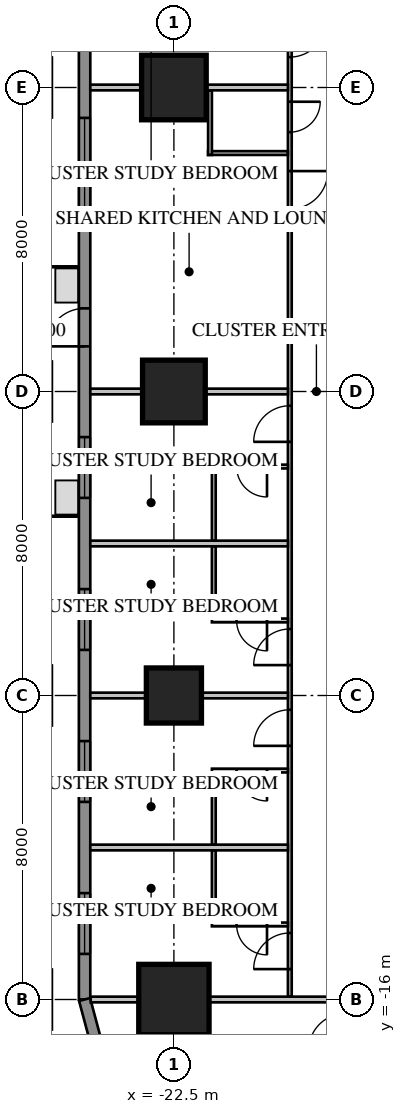
"""IFC4 building model, lengths in metres.
Left out: names, types, materials, properties, quantities, classifications, styles, units other than length and angle.
Written with IfcOpenShell. Run it as: python <this file> out.ifc"""

import sys

from ifc_helpers import new_model, si_unit, direction, frame, frame_2d, origin, origin_2d, place, context, subcontext, project, spatial, rectangle, extrude, element, fill, save


model = new_model("IFC4")
c1 = context("Model", 3, precision=1e-05, world=origin(), true_north=direction((0.0, 1.0)))
c2 = subcontext(c1, "Body", "Model", "MODEL_VIEW")
j1 = project(units=[si_unit("LENGTHUNIT", "METRE"), si_unit("PLANEANGLEUNIT", "RADIAN")], contexts=[c1])
p1 = place(None, origin())
s1 = spatial("IfcSite", under=j1, at=p1, CompositionType="ELEMENT")
p2 = place(p1, origin())
s2 = spatial("IfcBuilding", under=s1, at=p2, CompositionType="ELEMENT")
p3 = place(p2, frame((0.0, 0.0, 35.25)))
s3 = spatial("IfcBuildingStorey", under=s2, at=p3, CompositionType="ELEMENT", Elevation=35.25)
p4 = place(p3, frame((-22.5, 8.0, 0.0), z_axis=(0.0, 0.0, 1.0), x_axis=(1.0, 0.0, 0.0)))
e1 = element("IfcColumn", 1, at=p4, inside=s3, PredefinedType="COLUMN", context=c2, shape_type="SweptSolid", body=[
    extrude(rectangle(XDim=1.7, YDim=1.7, at=origin_2d()), origin(), (0.0, 0.0, 1.0), 3.85),
])
p5 = place(p3, frame((-22.5, 0.0, 0.0), z_axis=(0.0, 0.0, 1.0), x_axis=(1.0, 0.0, 0.0)))
e2 = element("IfcColumn", 2, at=p5, inside=s3, PredefinedType="COLUMN", context=c2, shape_type="SweptSolid", body=[
    extrude(rectangle(XDim=1.65, YDim=1.65, at=origin_2d()), origin(), (0.0, 0.0, 1.0), 3.85),
])
p6 = place(p3, frame((-22.5, -8.0, 0.0), z_axis=(0.0, 0.0, 1.0), x_axis=(1.0, 0.0, 0.0)))
e3 = element("IfcColumn", 3, at=p6, inside=s3, PredefinedType="COLUMN", context=c2, shape_type="SweptSolid", body=[
    extrude(rectangle(XDim=1.45, YDim=1.45, at=origin_2d()), origin(), (0.0, 0.0, 1.0), 3.85),
])
p7 = place(p3, frame((-22.5, -16.0, 0.0), z_axis=(0.0, 0.0, 1.0), x_axis=(1.0, 0.0, 0.0)))
e4 = element("IfcColumn", 4, at=p7, inside=s3, PredefinedType="COLUMN", context=c2, shape_type="SweptSolid", body=[
    extrude(rectangle(XDim=1.85, YDim=1.85, at=origin_2d()), origin(), (0.0, 0.0, 1.0), 3.85),
])
p8 = place(p3, frame((-24.85, 16.0, 0.0), z_axis=(0.0, 0.0, 1.0), x_axis=(0.0, -1.0, 0.0)))
e5 = element("IfcWall", 5, at=p8, inside=s3, PredefinedType="SOLIDWALL", context=c2, shape_type="SweptSolid", body=[
    extrude(rectangle(XDim=32.0, YDim=0.3, at=frame_2d((16.0, 0.0))), origin(), (0.0, 0.0, 1.0), 3.65),
])
p9 = place(p8, frame((1.2, 0.0, 0.75)))
e6 = element("IfcOpeningElement", 6, at=p9, cuts=e5, PredefinedType="OPENING", context=c2, shape_type="SweptSolid", body=[
    extrude(rectangle(XDim=1.6, YDim=1.8, at=frame_2d((0.8, 0.9))), frame((0.0, 0.17, 0.0), z_axis=(0.0, -1.0, 0.0), x_axis=(1.0, 0.0, 0.0)), (0.0, 0.0, 1.0), 0.34),
])
p10 = place(p8, frame((5.2, 0.0, 0.75)))
e7 = element("IfcOpeningElement", 7, at=p10, cuts=e5, PredefinedType="OPENING", context=c2, shape_type="SweptSolid", body=[
    extrude(rectangle(XDim=1.6, YDim=1.8, at=frame_2d((0.8, 0.9))), frame((0.0, 0.17, 0.0), z_axis=(0.0, -1.0, 0.0), x_axis=(1.0, 0.0, 0.0)), (0.0, 0.0, 1.0), 0.34),
])
p11 = place(p8, frame((17.2, 0.0, 0.75)))
e8 = element("IfcOpeningElement", 8, at=p11, cuts=e5, PredefinedType="OPENING", context=c2, shape_type="SweptSolid", body=[
    extrude(rectangle(XDim=1.6, YDim=1.8, at=frame_2d((0.8, 0.9))), frame((0.0, 0.17, 0.0), z_axis=(0.0, -1.0, 0.0), x_axis=(1.0, 0.0, 0.0)), (0.0, 0.0, 1.0), 0.34),
])
p12 = place(p8, frame((21.2, 0.0, 0.75)))
e9 = element("IfcOpeningElement", 9, at=p12, cuts=e5, PredefinedType="OPENING", context=c2, shape_type="SweptSolid", body=[
    extrude(rectangle(XDim=1.6, YDim=1.8, at=frame_2d((0.8, 0.9))), frame((0.0, 0.17, 0.0), z_axis=(0.0, -1.0, 0.0), x_axis=(1.0, 0.0, 0.0)), (0.0, 0.0, 1.0), 0.34),
])
p13 = place(p8, frame((25.2, 0.0, 0.75)))
e10 = element("IfcOpeningElement", 10, at=p13, cuts=e5, PredefinedType="OPENING", context=c2, shape_type="SweptSolid", body=[
    extrude(rectangle(XDim=1.6, YDim=1.8, at=frame_2d((0.8, 0.9))), frame((0.0, 0.17, 0.0), z_axis=(0.0, -1.0, 0.0), x_axis=(1.0, 0.0, 0.0)), (0.0, 0.0, 1.0), 0.34),
])
p14 = place(p8, frame((29.2, 0.0, 0.75)))
e11 = element("IfcOpeningElement", 11, at=p14, cuts=e5, PredefinedType="OPENING", context=c2, shape_type="SweptSolid", body=[
    extrude(rectangle(XDim=1.6, YDim=1.8, at=frame_2d((0.8, 0.9))), frame((0.0, 0.17, 0.0), z_axis=(0.0, -1.0, 0.0), x_axis=(1.0, 0.0, 0.0)), (0.0, 0.0, 1.0), 0.34),
])
p15 = place(p8, frame((8.8, 0.0, 0.75)))
e12 = element("IfcOpeningElement", 12, at=p15, cuts=e5, PredefinedType="OPENING", context=c2, shape_type="SweptSolid", body=[
    extrude(rectangle(XDim=2.4, YDim=1.8, at=frame_2d((1.2, 0.9))), frame((0.0, 0.17, 0.0), z_axis=(0.0, -1.0, 0.0), x_axis=(1.0, 0.0, 0.0)), (0.0, 0.0, 1.0), 0.34),
])
p16 = place(p8, frame((13.812, 0.0, 0.0)))
e13 = element("IfcOpeningElement", 13, at=p16, cuts=e5, PredefinedType="OPENING", context=c2, shape_type="SweptSolid", body=[
    extrude(rectangle(XDim=1.0, YDim=2.4, at=frame_2d((0.5, 1.2))), frame((0.0, 0.17, 0.0), z_axis=(0.0, -1.0, 0.0), x_axis=(1.0, 0.0, 0.0)), (0.0, 0.0, 1.0), 0.34),
])
p17 = place(p3, frame((-24.85, -16.0, 0.0), z_axis=(0.0, 0.0, 1.0), x_axis=(0.258839972501, -0.965920218567, 0.0)))
e14 = element("IfcWall", 14, at=p17, inside=s3, PredefinedType="SOLIDWALL", context=c2, shape_type="SweptSolid", body=[
    extrude(rectangle(XDim=4.581, YDim=0.3, at=frame_2d((2.291, 0.0))), origin(), (0.0, 0.0, 1.0), 3.65),
])
p18 = place(p3, frame((-19.45, 15.925, 0.0), z_axis=(0.0, 0.0, 1.0), x_axis=(0.0, -1.0, 0.0)))
e15 = element("IfcWall", 15, at=p18, inside=s3, PredefinedType="PARTITIONING", context=c2, shape_type="SweptSolid", body=[
    extrude(rectangle(XDim=31.85, YDim=0.1, at=frame_2d((15.925, 0.0))), origin(), (0.0, 0.0, 1.0), 3.65),
])
p19 = place(p18, frame((10.125, 0.0, 0.0)))
e16 = element("IfcOpeningElement", 16, at=p19, cuts=e15, PredefinedType="OPENING", context=c2, shape_type="SweptSolid", body=[
    extrude(rectangle(XDim=1.0, YDim=2.1, at=frame_2d((0.5, 1.05))), frame((0.0, 0.07, 0.0), z_axis=(0.0, -1.0, 0.0), x_axis=(1.0, 0.0, 0.0)), (0.0, 0.0, 1.0), 0.14),
])
p20 = place(p18, frame((8.3, 0.0, 0.0)))
e17 = element("IfcOpeningElement", 17, at=p20, cuts=e15, PredefinedType="OPENING", context=c2, shape_type="SweptSolid", body=[
    extrude(rectangle(XDim=0.8, YDim=2.1, at=frame_2d((0.4, 1.05))), frame((0.0, 0.07, 0.0), z_axis=(0.0, -1.0, 0.0), x_axis=(1.0, 0.0, 0.0)), (0.0, 0.0, 1.0), 0.14),
])
p21 = place(p18, frame((0.3, 0.0, 0.0)))
e18 = element("IfcOpeningElement", 18, at=p21, cuts=e15, PredefinedType="OPENING", context=c2, shape_type="SweptSolid", body=[
    extrude(rectangle(XDim=0.95, YDim=2.1, at=frame_2d((0.475, 1.05))), frame((0.0, 0.07, 0.0), z_axis=(0.0, -1.0, 0.0), x_axis=(1.0, 0.0, 0.0)), (0.0, 0.0, 1.0), 0.14),
])
p22 = place(p18, frame((6.175, 0.0, 0.0)))
e19 = element("IfcOpeningElement", 19, at=p22, cuts=e15, PredefinedType="OPENING", context=c2, shape_type="SweptSolid", body=[
    extrude(rectangle(XDim=0.95, YDim=2.1, at=frame_2d((0.475, 1.05))), frame((0.0, 0.07, 0.0), z_axis=(0.0, -1.0, 0.0), x_axis=(1.0, 0.0, 0.0)), (0.0, 0.0, 1.0), 0.14),
])
p23 = place(p18, frame((16.3, 0.0, 0.0)))
e20 = element("IfcOpeningElement", 20, at=p23, cuts=e15, PredefinedType="OPENING", context=c2, shape_type="SweptSolid", body=[
    extrude(rectangle(XDim=0.95, YDim=2.1, at=frame_2d((0.475, 1.05))), frame((0.0, 0.07, 0.0), z_axis=(0.0, -1.0, 0.0), x_axis=(1.0, 0.0, 0.0)), (0.0, 0.0, 1.0), 0.14),
])
p24 = place(p18, frame((22.175, 0.0, 0.0)))
e21 = element("IfcOpeningElement", 21, at=p24, cuts=e15, PredefinedType="OPENING", context=c2, shape_type="SweptSolid", body=[
    extrude(rectangle(XDim=0.95, YDim=2.1, at=frame_2d((0.475, 1.05))), frame((0.0, 0.07, 0.0), z_axis=(0.0, -1.0, 0.0), x_axis=(1.0, 0.0, 0.0)), (0.0, 0.0, 1.0), 0.14),
])
p25 = place(p18, frame((24.3, 0.0, 0.0)))
e22 = element("IfcOpeningElement", 22, at=p25, cuts=e15, PredefinedType="OPENING", context=c2, shape_type="SweptSolid", body=[
    extrude(rectangle(XDim=0.95, YDim=2.1, at=frame_2d((0.475, 1.05))), frame((0.0, 0.07, 0.0), z_axis=(0.0, -1.0, 0.0), x_axis=(1.0, 0.0, 0.0)), (0.0, 0.0, 1.0), 0.14),
])
p26 = place(p18, frame((30.175, 0.0, 0.0)))
e23 = element("IfcOpeningElement", 23, at=p26, cuts=e15, PredefinedType="OPENING", context=c2, shape_type="SweptSolid", body=[
    extrude(rectangle(XDim=0.95, YDim=2.1, at=frame_2d((0.475, 1.05))), frame((0.0, 0.07, 0.0), z_axis=(0.0, -1.0, 0.0), x_axis=(1.0, 0.0, 0.0)), (0.0, 0.0, 1.0), 0.14),
])
p27 = place(p3, frame((-19.5, 6.275, 0.0), z_axis=(0.0, 0.0, 1.0), x_axis=(-1.0, 0.0, 0.0)))
e24 = element("IfcWall", 24, at=p27, inside=s3, PredefinedType="PARTITIONING", context=c2, shape_type="SweptSolid", body=[
    extrude(rectangle(XDim=2.1, YDim=0.1, at=frame_2d((1.05, 0.0))), origin(), (0.0, 0.0, 1.0), 3.65),
])
p28 = place(p3, frame((-21.55, 7.925, 0.0), z_axis=(0.0, 0.0, 1.0), x_axis=(0.0, -1.0, 0.0)))
e25 = element("IfcWall", 25, at=p28, inside=s3, PredefinedType="PARTITIONING", context=c2, shape_type="SweptSolid", body=[
    extrude(rectangle(XDim=1.7, YDim=0.1, at=frame_2d((0.85, 0.0))), origin(), (0.0, 0.0, 1.0), 3.65),
])
p29 = place(p3, frame((-19.5, 8.0, 0.0), z_axis=(0.0, 0.0, 1.0), x_axis=(-1.0, 0.0, 0.0)))
e26 = element("IfcWall", 26, at=p29, inside=s3, PredefinedType="PARTITIONING", context=c2, shape_type="SweptSolid", body=[
    extrude(rectangle(XDim=5.2, YDim=0.15, at=frame_2d((2.6, 0.0))), origin(), (0.0, 0.0, 1.0), 3.65),
])
p30 = place(p3, frame((-19.5, 0.0, 0.0), z_axis=(0.0, 0.0, 1.0), x_axis=(-1.0, 0.0, 0.0)))
e27 = element("IfcWall", 27, at=p30, inside=s3, PredefinedType="PARTITIONING", context=c2, shape_type="SweptSolid", body=[
    extrude(rectangle(XDim=5.2, YDim=0.15, at=frame_2d((2.6, 0.0))), origin(), (0.0, 0.0, 1.0), 2.957),
])
for number, where, z_axis, x_axis in (
    (28, (-19.5, -4.0, 0.0), (0.0, 0.0, 1.0), (-1.0, 0.0, 0.0)),
    (29, (-19.5, -8.0, 0.0), (0.0, 0.0, 1.0), (-1.0, 0.0, 0.0)),
    (30, (-19.5, -12.0, 0.0), (0.0, 0.0, 1.0), (-1.0, 0.0, 0.0)),
):
    element("IfcWall", number, at=place(p3, frame(where, z_axis=z_axis, x_axis=x_axis)), inside=s3, PredefinedType="PARTITIONING", context=c2, shape_type="SweptSolid", body=[
        extrude(rectangle(XDim=5.2, YDim=0.15, at=frame_2d((2.6, 0.0))), origin(), (0.0, 0.0, 1.0), 3.65),
    ])
p31 = place(p3, frame((-18.1, -16.0, 0.0), z_axis=(0.0, 0.0, 1.0), x_axis=(-1.0, 0.0, 0.0)))
e31 = element("IfcWall", 31, at=p31, inside=s3, PredefinedType="PARTITIONING", context=c2, shape_type="SweptSolid", body=[
    extrude(rectangle(XDim=6.589, YDim=0.15, at=frame_2d((3.295, 0.0))), origin(), (0.0, 0.0, 1.0), 3.65),
])
p32 = place(p3, frame((-19.5, -1.975, 0.0), z_axis=(0.0, 0.0, 1.0), x_axis=(-1.0, 0.0, 0.0)))
e32 = element("IfcWall", 32, at=p32, inside=s3, PredefinedType="PARTITIONING", context=c2, shape_type="SweptSolid", body=[
    extrude(rectangle(XDim=2.0, YDim=0.1, at=frame_2d((1.0, 0.0))), origin(), (0.0, 0.0, 1.0), 3.65),
])
p33 = place(p32, frame((0.55, 0.0, 0.0)))
e33 = element("IfcOpeningElement", 33, at=p33, cuts=e32, PredefinedType="OPENING", context=c2, shape_type="SweptSolid", body=[
    extrude(rectangle(XDim=0.8, YDim=2.1, at=frame_2d((0.4, 1.05))), frame((0.0, 0.07, 0.0), z_axis=(0.0, -1.0, 0.0), x_axis=(1.0, 0.0, 0.0)), (0.0, 0.0, 1.0), 0.14),
])
p34 = place(p3, frame((-21.45, -2.025, 0.0), z_axis=(0.0, 0.0, 1.0), x_axis=(0.0, -1.0, 0.0)))
e34 = element("IfcWall", 34, at=p34, inside=s3, PredefinedType="PARTITIONING", context=c2, shape_type="SweptSolid", body=[
    extrude(rectangle(XDim=1.9, YDim=0.1, at=frame_2d((0.95, 0.0))), origin(), (0.0, 0.0, 1.0), 3.65),
])
p35 = place(p3, frame((-19.5, -6.025, 0.0), z_axis=(0.0, 0.0, 1.0), x_axis=(-1.0, 0.0, 0.0)))
e35 = element("IfcWall", 35, at=p35, inside=s3, PredefinedType="PARTITIONING", context=c2, shape_type="SweptSolid", body=[
    extrude(rectangle(XDim=2.0, YDim=0.1, at=frame_2d((1.0, 0.0))), origin(), (0.0, 0.0, 1.0), 3.65),
])
p36 = place(p35, frame((0.55, 0.0, 0.0)))
e36 = element("IfcOpeningElement", 36, at=p36, cuts=e35, PredefinedType="OPENING", context=c2, shape_type="SweptSolid", body=[
    extrude(rectangle(XDim=0.8, YDim=2.1, at=frame_2d((0.4, 1.05))), frame((0.0, 0.07, 0.0), z_axis=(0.0, -1.0, 0.0), x_axis=(1.0, 0.0, 0.0)), (0.0, 0.0, 1.0), 0.14),
])
p37 = place(p3, frame((-21.45, -4.075, 0.0), z_axis=(0.0, 0.0, 1.0), x_axis=(0.0, -1.0, 0.0)))
e37 = element("IfcWall", 37, at=p37, inside=s3, PredefinedType="PARTITIONING", context=c2, shape_type="SweptSolid", body=[
    extrude(rectangle(XDim=1.9, YDim=0.1, at=frame_2d((0.95, 0.0))), origin(), (0.0, 0.0, 1.0), 3.65),
])
p38 = place(p3, frame((-19.5, -9.975, 0.0), z_axis=(0.0, 0.0, 1.0), x_axis=(-1.0, 0.0, 0.0)))
e38 = element("IfcWall", 38, at=p38, inside=s3, PredefinedType="PARTITIONING", context=c2, shape_type="SweptSolid", body=[
    extrude(rectangle(XDim=2.0, YDim=0.1, at=frame_2d((1.0, 0.0))), origin(), (0.0, 0.0, 1.0), 3.65),
])
p39 = place(p38, frame((0.55, 0.0, 0.0)))
e39 = element("IfcOpeningElement", 39, at=p39, cuts=e38, PredefinedType="OPENING", context=c2, shape_type="SweptSolid", body=[
    extrude(rectangle(XDim=0.8, YDim=2.1, at=frame_2d((0.4, 1.05))), frame((0.0, 0.07, 0.0), z_axis=(0.0, -1.0, 0.0), x_axis=(1.0, 0.0, 0.0)), (0.0, 0.0, 1.0), 0.14),
])
p40 = place(p3, frame((-21.45, -10.025, 0.0), z_axis=(0.0, 0.0, 1.0), x_axis=(0.0, -1.0, 0.0)))
e40 = element("IfcWall", 40, at=p40, inside=s3, PredefinedType="PARTITIONING", context=c2, shape_type="SweptSolid", body=[
    extrude(rectangle(XDim=1.9, YDim=0.1, at=frame_2d((0.95, 0.0))), origin(), (0.0, 0.0, 1.0), 3.65),
])
p41 = place(p3, frame((-19.5, -14.025, 0.0), z_axis=(0.0, 0.0, 1.0), x_axis=(-1.0, 0.0, 0.0)))
e41 = element("IfcWall", 41, at=p41, inside=s3, PredefinedType="PARTITIONING", context=c2, shape_type="SweptSolid", body=[
    extrude(rectangle(XDim=2.0, YDim=0.1, at=frame_2d((1.0, 0.0))), origin(), (0.0, 0.0, 1.0), 3.65),
])
p42 = place(p41, frame((0.55, 0.0, 0.0)))
e42 = element("IfcOpeningElement", 42, at=p42, cuts=e41, PredefinedType="OPENING", context=c2, shape_type="SweptSolid", body=[
    extrude(rectangle(XDim=0.8, YDim=2.1, at=frame_2d((0.4, 1.05))), frame((0.0, 0.07, 0.0), z_axis=(0.0, -1.0, 0.0), x_axis=(1.0, 0.0, 0.0)), (0.0, 0.0, 1.0), 0.14),
])
p43 = place(p3, frame((-21.45, -12.075, 0.0), z_axis=(0.0, 0.0, 1.0), x_axis=(0.0, -1.0, 0.0)))
e43 = element("IfcWall", 43, at=p43, inside=s3, PredefinedType="PARTITIONING", context=c2, shape_type="SweptSolid", body=[
    extrude(rectangle(XDim=1.9, YDim=0.1, at=frame_2d((0.95, 0.0))), origin(), (0.0, 0.0, 1.0), 3.65),
])
p44 = place(p11, origin())
e44 = element("IfcWindow", 44, at=p44, inside=s3, PartitioningType="SINGLE_PANEL", PredefinedType="WINDOW", context=c2, shape_type="SweptSolid", body=[
    extrude(rectangle(XDim=1.6, YDim=1.8, at=frame_2d((0.8, 0.9))), frame((0.0, 0.03, 0.0), z_axis=(0.0, -1.0, 0.0), x_axis=(1.0, 0.0, 0.0)), (0.0, 0.0, 1.0), 0.06),
])
fill(e8, e44)
p45 = place(p12, origin())
e45 = element("IfcWindow", 45, at=p45, inside=s3, PartitioningType="SINGLE_PANEL", PredefinedType="WINDOW", context=c2, shape_type="SweptSolid", body=[
    extrude(rectangle(XDim=1.6, YDim=1.8, at=frame_2d((0.8, 0.9))), frame((0.0, 0.03, 0.0), z_axis=(0.0, -1.0, 0.0), x_axis=(1.0, 0.0, 0.0)), (0.0, 0.0, 1.0), 0.06),
])
fill(e9, e45)
p46 = place(p13, origin())
e46 = element("IfcWindow", 46, at=p46, inside=s3, PartitioningType="SINGLE_PANEL", PredefinedType="WINDOW", context=c2, shape_type="SweptSolid", body=[
    extrude(rectangle(XDim=1.6, YDim=1.8, at=frame_2d((0.8, 0.9))), frame((0.0, 0.03, 0.0), z_axis=(0.0, -1.0, 0.0), x_axis=(1.0, 0.0, 0.0)), (0.0, 0.0, 1.0), 0.06),
])
fill(e10, e46)
p47 = place(p14, origin())
e47 = element("IfcWindow", 47, at=p47, inside=s3, PartitioningType="SINGLE_PANEL", PredefinedType="WINDOW", context=c2, shape_type="SweptSolid", body=[
    extrude(rectangle(XDim=1.6, YDim=1.8, at=frame_2d((0.8, 0.9))), frame((0.0, 0.03, 0.0), z_axis=(0.0, -1.0, 0.0), x_axis=(1.0, 0.0, 0.0)), (0.0, 0.0, 1.0), 0.06),
])
fill(e11, e47)
p48 = place(p15, origin())
e48 = element("IfcWindow", 48, at=p48, inside=s3, PartitioningType="SINGLE_PANEL", PredefinedType="WINDOW", context=c2, shape_type="SweptSolid", body=[
    extrude(rectangle(XDim=2.4, YDim=1.8, at=frame_2d((1.2, 0.9))), frame((0.0, 0.03, 0.0), z_axis=(0.0, -1.0, 0.0), x_axis=(1.0, 0.0, 0.0)), (0.0, 0.0, 1.0), 0.06),
])
fill(e12, e48)
p49 = place(p16, origin())
e49 = element("IfcDoor", 49, at=p49, inside=s3, OperationType="SINGLE_SWING_RIGHT", PredefinedType="DOOR", context=c2, shape_type="SweptSolid", body=[
    extrude(rectangle(XDim=1.0, YDim=2.4, at=frame_2d((0.5, 1.2))), frame((0.0, 0.025, 0.0), z_axis=(0.0, -1.0, 0.0), x_axis=(1.0, 0.0, 0.0)), (0.0, 0.0, 1.0), 0.05),
])
fill(e13, e49)
p50 = place(p19, origin())
e50 = element("IfcDoor", 50, at=p50, inside=s3, OperationType="SINGLE_SWING_LEFT", PredefinedType="DOOR", context=c2, shape_type="SweptSolid", body=[
    extrude(rectangle(XDim=1.0, YDim=2.1, at=frame_2d((0.5, 1.05))), frame((0.0, 0.025, 0.0), z_axis=(0.0, -1.0, 0.0), x_axis=(1.0, 0.0, 0.0)), (0.0, 0.0, 1.0), 0.05),
])
fill(e16, e50)
p51 = place(p20, origin())
e51 = element("IfcDoor", 51, at=p51, inside=s3, OperationType="SINGLE_SWING_LEFT", PredefinedType="DOOR", context=c2, shape_type="SweptSolid", body=[
    extrude(rectangle(XDim=0.8, YDim=2.1, at=frame_2d((0.4, 1.05))), frame((0.0, 0.025, 0.0), z_axis=(0.0, -1.0, 0.0), x_axis=(1.0, 0.0, 0.0)), (0.0, 0.0, 1.0), 0.05),
])
fill(e17, e51)
p52 = place(p22, origin())
e52 = element("IfcDoor", 52, at=p52, inside=s3, OperationType="SINGLE_SWING_LEFT", PredefinedType="DOOR", context=c2, shape_type="SweptSolid", body=[
    extrude(rectangle(XDim=0.95, YDim=2.1, at=frame_2d((0.475, 1.05))), frame((0.0, 0.025, 0.0), z_axis=(0.0, -1.0, 0.0), x_axis=(1.0, 0.0, 0.0)), (0.0, 0.0, 1.0), 0.05),
])
fill(e19, e52)
p53 = place(p23, origin())
e53 = element("IfcDoor", 53, at=p53, inside=s3, OperationType="SINGLE_SWING_RIGHT", PredefinedType="DOOR", context=c2, shape_type="SweptSolid", body=[
    extrude(rectangle(XDim=0.95, YDim=2.1, at=frame_2d((0.475, 1.05))), frame((0.0, 0.025, 0.0), z_axis=(0.0, -1.0, 0.0), x_axis=(1.0, 0.0, 0.0)), (0.0, 0.0, 1.0), 0.05),
])
fill(e20, e53)
p54 = place(p33, origin())
e54 = element("IfcDoor", 54, at=p54, inside=s3, OperationType="SINGLE_SWING_LEFT", PredefinedType="DOOR", context=c2, shape_type="SweptSolid", body=[
    extrude(rectangle(XDim=0.8, YDim=2.1, at=frame_2d((0.4, 1.05))), frame((0.0, 0.025, 0.0), z_axis=(0.0, -1.0, 0.0), x_axis=(1.0, 0.0, 0.0)), (0.0, 0.0, 1.0), 0.05),
])
fill(e33, e54)
p55 = place(p24, origin())
e55 = element("IfcDoor", 55, at=p55, inside=s3, OperationType="SINGLE_SWING_RIGHT", PredefinedType="DOOR", context=c2, shape_type="SweptSolid", body=[
    extrude(rectangle(XDim=0.95, YDim=2.1, at=frame_2d((0.475, 1.05))), frame((0.0, 0.025, 0.0), z_axis=(0.0, -1.0, 0.0), x_axis=(1.0, 0.0, 0.0)), (0.0, 0.0, 1.0), 0.05),
])
fill(e21, e55)
p56 = place(p36, origin())
e56 = element("IfcDoor", 56, at=p56, inside=s3, OperationType="SINGLE_SWING_LEFT", PredefinedType="DOOR", context=c2, shape_type="SweptSolid", body=[
    extrude(rectangle(XDim=0.8, YDim=2.1, at=frame_2d((0.4, 1.05))), frame((0.0, 0.025, 0.0), z_axis=(0.0, -1.0, 0.0), x_axis=(1.0, 0.0, 0.0)), (0.0, 0.0, 1.0), 0.05),
])
fill(e36, e56)
p57 = place(p25, origin())
e57 = element("IfcDoor", 57, at=p57, inside=s3, OperationType="SINGLE_SWING_RIGHT", PredefinedType="DOOR", context=c2, shape_type="SweptSolid", body=[
    extrude(rectangle(XDim=0.95, YDim=2.1, at=frame_2d((0.475, 1.05))), frame((0.0, 0.025, 0.0), z_axis=(0.0, -1.0, 0.0), x_axis=(1.0, 0.0, 0.0)), (0.0, 0.0, 1.0), 0.05),
])
fill(e22, e57)
p58 = place(p39, origin())
e58 = element("IfcDoor", 58, at=p58, inside=s3, OperationType="SINGLE_SWING_LEFT", PredefinedType="DOOR", context=c2, shape_type="SweptSolid", body=[
    extrude(rectangle(XDim=0.8, YDim=2.1, at=frame_2d((0.4, 1.05))), frame((0.0, 0.025, 0.0), z_axis=(0.0, -1.0, 0.0), x_axis=(1.0, 0.0, 0.0)), (0.0, 0.0, 1.0), 0.05),
])
fill(e39, e58)
p59 = place(p26, origin())
e59 = element("IfcDoor", 59, at=p59, inside=s3, OperationType="SINGLE_SWING_RIGHT", PredefinedType="DOOR", context=c2, shape_type="SweptSolid", body=[
    extrude(rectangle(XDim=0.95, YDim=2.1, at=frame_2d((0.475, 1.05))), frame((0.0, 0.025, 0.0), z_axis=(0.0, -1.0, 0.0), x_axis=(1.0, 0.0, 0.0)), (0.0, 0.0, 1.0), 0.05),
])
fill(e23, e59)
p60 = place(p42, origin())
e60 = element("IfcDoor", 60, at=p60, inside=s3, OperationType="SINGLE_SWING_LEFT", PredefinedType="DOOR", context=c2, shape_type="SweptSolid", body=[
    extrude(rectangle(XDim=0.8, YDim=2.1, at=frame_2d((0.4, 1.05))), frame((0.0, 0.025, 0.0), z_axis=(0.0, -1.0, 0.0), x_axis=(1.0, 0.0, 0.0)), (0.0, 0.0, 1.0), 0.05),
])
fill(e42, e60)
save(model, sys.argv[1])
